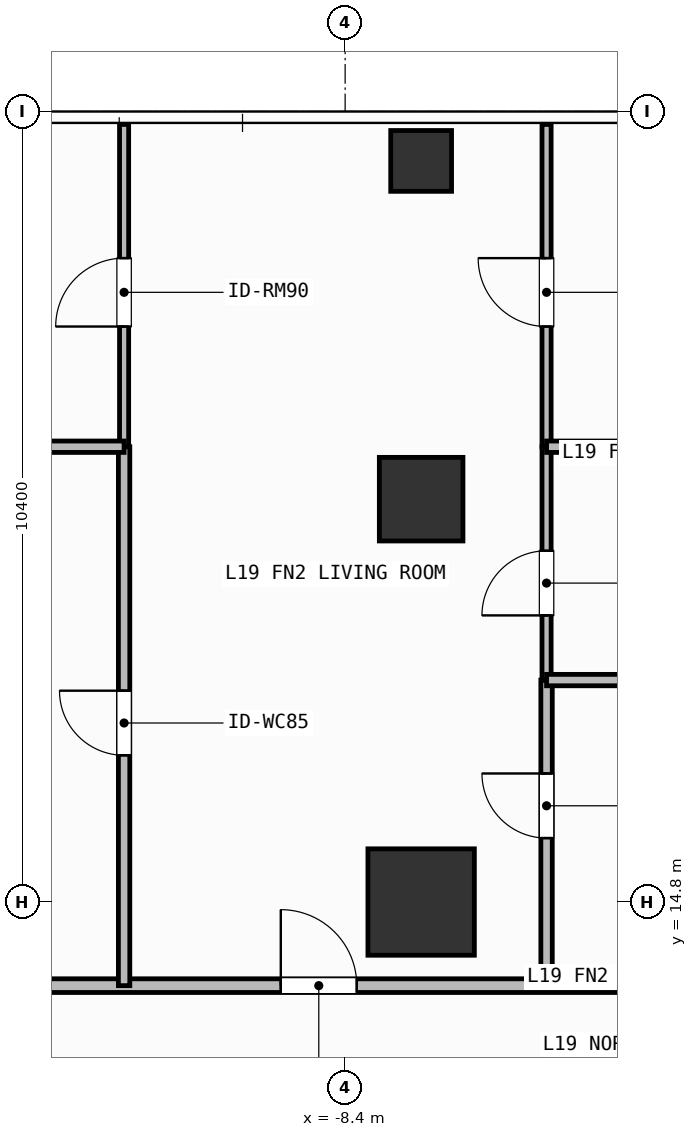
"""IFC4 building model, lengths in metres.
Left out: names, types, materials, properties, quantities, classifications, styles, units other than length and angle.
Written with IfcOpenShell. Run it as: python <this file> out.ifc"""

import sys

from ifc_helpers import new_model, si_unit, direction, frame, frame_2d, origin, origin_2d, place, context, subcontext, project, spatial, rectangle, hollow_rectangle, extrude, element, fill, save


model = new_model("IFC4")
c1 = context("Model", 3, precision=1e-05, world=origin(), true_north=direction((0.0, 1.0)))
c2 = subcontext(c1, "Body", "Model", "MODEL_VIEW")
j1 = project(units=[si_unit("LENGTHUNIT", "METRE"), si_unit("PLANEANGLEUNIT", "RADIAN")], contexts=[c1])
p1 = place(None, origin())
s1 = spatial("IfcSite", under=j1, at=p1, CompositionType="ELEMENT")
p2 = place(p1, origin())
s2 = spatial("IfcBuilding", under=s1, at=p2, CompositionType="ELEMENT")
p3 = place(p2, frame((0.0, 0.0, 73.5)))
s3 = spatial("IfcBuildingStorey", under=s2, at=p3, CompositionType="ELEMENT", Elevation=73.5)
p4 = place(p3, frame((-7.4, 14.8, 0.0), z_axis=(0.0, 0.0, 1.0), x_axis=(1.0, 0.0, 0.0)))
e1 = element("IfcColumn", 1, at=p4, inside=s3, PredefinedType="COLUMN", context=c2, shape_type="SweptSolid", body=[
    extrude(rectangle(XDim=1.4, YDim=1.4, at=origin_2d()), origin(), (0.0, 0.0, 1.0), 3.9),
])
p5 = place(p3, frame((-7.4, 20.1, 0.0), z_axis=(0.0, 0.0, 1.0), x_axis=(1.0, 0.0, 0.0)))
e2 = element("IfcColumn", 2, at=p5, inside=s3, PredefinedType="COLUMN", context=c2, shape_type="SweptSolid", body=[
    extrude(rectangle(XDim=1.1, YDim=1.1, at=origin_2d()), origin(), (0.0, 0.0, 1.0), 3.9),
])
p6 = place(p3, frame((-7.4, 24.55, 0.0), z_axis=(0.0, 0.0, 1.0), x_axis=(1.0, 0.0, 0.0)))
e3 = element("IfcColumn", 3, at=p6, inside=s3, PredefinedType="COLUMN", context=c2, shape_type="SweptSolid", body=[
    extrude(hollow_rectangle(XDim=0.8, YDim=0.8, WallThickness=0.036, at=origin_2d()), origin(), (0.0, 0.0, 1.0), 3.9),
])
p7 = place(p3, frame((-14.951, 13.7, 0.0), z_axis=(0.0, 0.0, 1.0), x_axis=(1.0, 0.0, 0.0)))
e4 = element("IfcWall", 4, at=p7, inside=s3, PredefinedType="PARTITIONING", context=c2, shape_type="SweptSolid", body=[
    extrude(rectangle(XDim=12.051, YDim=0.18, at=frame_2d((6.025, 0.0))), origin(), (0.0, 0.0, 1.0), 3.6),
])
p8 = place(p7, frame((5.704, 0.0, 0.0)))
e5 = element("IfcOpeningElement", 5, at=p8, cuts=e4, PredefinedType="OPENING", context=c2, shape_type="SweptSolid", body=[
    extrude(rectangle(XDim=1.0, YDim=2.2, at=frame_2d((0.5, 1.1))), frame((0.0, 0.1, 0.0), z_axis=(0.0, -1.0, 0.0), x_axis=(1.0, 0.0, 0.0)), (0.0, 0.0, 1.0), 0.2),
])
p9 = place(p3, frame((-11.308, 13.7, 0.0), z_axis=(0.0, 0.0, 1.0), x_axis=(0.0, 1.0, 0.0)))
e6 = element("IfcWall", 6, at=p9, inside=s3, PredefinedType="PARTITIONING", context=c2, shape_type="SweptSolid", body=[
    extrude(rectangle(XDim=7.09, YDim=0.15, at=frame_2d((3.545, 0.0))), origin(), (0.0, 0.0, 1.0), 3.29),
])
p10 = place(p9, frame((3.03, 0.0, 0.0)))
e7 = element("IfcOpeningElement", 7, at=p10, cuts=e6, PredefinedType="OPENING", context=c2, shape_type="SweptSolid", body=[
    extrude(rectangle(XDim=0.85, YDim=2.1, at=frame_2d((0.425, 1.05))), frame((0.0, 0.085, 0.0), z_axis=(0.0, -1.0, 0.0), x_axis=(1.0, 0.0, 0.0)), (0.0, 0.0, 1.0), 0.17),
])
p11 = place(p3, frame((-11.308, 20.79, 0.0), z_axis=(0.0, 0.0, 1.0), x_axis=(0.0, 1.0, 0.0)))
e8 = element("IfcWall", 8, at=p11, inside=s3, PredefinedType="PARTITIONING", context=c2, shape_type="SweptSolid", body=[
    extrude(rectangle(XDim=4.24, YDim=0.12, at=frame_2d((2.12, 0.0))), origin(), (0.0, 0.0, 1.0), 3.29),
])
p12 = place(p11, frame((1.581, 0.0, 0.0)))
e9 = element("IfcOpeningElement", 9, at=p12, cuts=e8, PredefinedType="OPENING", context=c2, shape_type="SweptSolid", body=[
    extrude(rectangle(XDim=0.9, YDim=2.1, at=frame_2d((0.45, 1.05))), frame((0.0, 0.07, 0.0), z_axis=(0.0, -1.0, 0.0), x_axis=(1.0, 0.0, 0.0)), (0.0, 0.0, 1.0), 0.14),
])
p13 = place(p3, frame((-5.75, 13.7, 0.0), z_axis=(0.0, 0.0, 1.0), x_axis=(0.0, 1.0, 0.0)))
e10 = element("IfcWall", 10, at=p13, inside=s3, PredefinedType="PARTITIONING", context=c2, shape_type="SweptSolid", body=[
    extrude(rectangle(XDim=4.02, YDim=0.15, at=frame_2d((2.01, 0.0))), origin(), (0.0, 0.0, 1.0), 3.6),
])
p14 = place(p13, frame((1.941, 0.0, 0.0)))
e11 = element("IfcOpeningElement", 11, at=p14, cuts=e10, PredefinedType="OPENING", context=c2, shape_type="SweptSolid", body=[
    extrude(rectangle(XDim=0.85, YDim=2.1, at=frame_2d((0.425, 1.05))), frame((0.0, 0.085, 0.0), z_axis=(0.0, -1.0, 0.0), x_axis=(1.0, 0.0, 0.0)), (0.0, 0.0, 1.0), 0.17),
])
p15 = place(p3, frame((-5.75, 17.72, 0.0), z_axis=(0.0, 0.0, 1.0), x_axis=(0.0, 1.0, 0.0)))
e12 = element("IfcWall", 12, at=p15, inside=s3, PredefinedType="PARTITIONING", context=c2, shape_type="SweptSolid", body=[
    extrude(rectangle(XDim=3.07, YDim=0.12, at=frame_2d((1.535, 0.0))), origin(), (0.0, 0.0, 1.0), 3.6),
])
p16 = place(p15, frame((0.851, 0.0, 0.0)))
e13 = element("IfcOpeningElement", 13, at=p16, cuts=e12, PredefinedType="OPENING", context=c2, shape_type="SweptSolid", body=[
    extrude(rectangle(XDim=0.85, YDim=2.1, at=frame_2d((0.425, 1.05))), frame((0.0, 0.07, 0.0), z_axis=(0.0, -1.0, 0.0), x_axis=(1.0, 0.0, 0.0)), (0.0, 0.0, 1.0), 0.14),
])
p17 = place(p3, frame((-5.75, 20.79, 0.0), z_axis=(0.0, 0.0, 1.0), x_axis=(0.0, 1.0, 0.0)))
e14 = element("IfcWall", 14, at=p17, inside=s3, PredefinedType="PARTITIONING", context=c2, shape_type="SweptSolid", body=[
    extrude(rectangle(XDim=4.24, YDim=0.12, at=frame_2d((2.12, 0.0))), origin(), (0.0, 0.0, 1.0), 3.6),
])
p18 = place(p17, frame((1.581, 0.0, 0.0)))
e15 = element("IfcOpeningElement", 15, at=p18, cuts=e14, PredefinedType="OPENING", context=c2, shape_type="SweptSolid", body=[
    extrude(rectangle(XDim=0.9, YDim=2.1, at=frame_2d((0.45, 1.05))), frame((0.0, 0.07, 0.0), z_axis=(0.0, -1.0, 0.0), x_axis=(1.0, 0.0, 0.0)), (0.0, 0.0, 1.0), 0.14),
])
p19 = place(p3, frame((-14.951, 20.79, 0.0), z_axis=(0.0, 0.0, 1.0), x_axis=(1.0, 0.0, 0.0)))
e16 = element("IfcWall", 16, at=p19, inside=s3, PredefinedType="PARTITIONING", context=c2, shape_type="SweptSolid", body=[
    extrude(rectangle(XDim=3.643, YDim=0.15, at=frame_2d((1.821, 0.0))), origin(), (0.0, 0.0, 1.0), 3.6),
])
for number, where, z_axis, x_axis in (
    (17, (-5.75, 17.72, 0.0), (0.0, 0.0, 1.0), (1.0, 0.0, 0.0)),
    (18, (-5.75, 20.79, 0.0), (0.0, 0.0, 1.0), (1.0, 0.0, 0.0)),
):
    element("IfcWall", number, at=place(p3, frame(where, z_axis=z_axis, x_axis=x_axis)), inside=s3, PredefinedType="PARTITIONING", context=c2, shape_type="SweptSolid", body=[
        extrude(rectangle(XDim=2.85, YDim=0.15, at=frame_2d((1.425, 0.0))), origin(), (0.0, 0.0, 1.0), 3.6),
    ])
p20 = place(p8, origin())
e19 = element("IfcDoor", 19, at=p20, inside=s3, OperationType="SINGLE_SWING_LEFT", PredefinedType="DOOR", context=c2, shape_type="SweptSolid", body=[
    extrude(rectangle(XDim=1.0, YDim=2.2, at=frame_2d((0.5, 1.1))), frame((0.0, 0.025, 0.0), z_axis=(0.0, -1.0, 0.0), x_axis=(1.0, 0.0, 0.0)), (0.0, 0.0, 1.0), 0.05),
])
fill(e5, e19)
p21 = place(p10, origin())
e20 = element("IfcDoor", 20, at=p21, inside=s3, OperationType="SINGLE_SWING_RIGHT", PredefinedType="DOOR", context=c2, shape_type="SweptSolid", body=[
    extrude(rectangle(XDim=0.85, YDim=2.1, at=frame_2d((0.425, 1.05))), frame((0.0, 0.025, 0.0), z_axis=(0.0, -1.0, 0.0), x_axis=(1.0, 0.0, 0.0)), (0.0, 0.0, 1.0), 0.05),
])
fill(e7, e20)
p22 = place(p12, origin())
e21 = element("IfcDoor", 21, at=p22, inside=s3, OperationType="SINGLE_SWING_LEFT", PredefinedType="DOOR", context=c2, shape_type="SweptSolid", body=[
    extrude(rectangle(XDim=0.9, YDim=2.1, at=frame_2d((0.45, 1.05))), frame((0.0, 0.025, 0.0), z_axis=(0.0, -1.0, 0.0), x_axis=(1.0, 0.0, 0.0)), (0.0, 0.0, 1.0), 0.05),
])
fill(e9, e21)
p23 = place(p14, origin())
e22 = element("IfcDoor", 22, at=p23, inside=s3, OperationType="SINGLE_SWING_RIGHT", PredefinedType="DOOR", context=c2, shape_type="SweptSolid", body=[
    extrude(rectangle(XDim=0.85, YDim=2.1, at=frame_2d((0.425, 1.05))), frame((0.0, 0.025, 0.0), z_axis=(0.0, -1.0, 0.0), x_axis=(1.0, 0.0, 0.0)), (0.0, 0.0, 1.0), 0.05),
])
fill(e11, e22)
p24 = place(p16, origin())
e23 = element("IfcDoor", 23, at=p24, inside=s3, OperationType="SINGLE_SWING_LEFT", PredefinedType="DOOR", context=c2, shape_type="SweptSolid", body=[
    extrude(rectangle(XDim=0.85, YDim=2.1, at=frame_2d((0.425, 1.05))), frame((0.0, 0.025, 0.0), z_axis=(0.0, -1.0, 0.0), x_axis=(1.0, 0.0, 0.0)), (0.0, 0.0, 1.0), 0.05),
])
fill(e13, e23)
p25 = place(p18, origin())
e24 = element("IfcDoor", 24, at=p25, inside=s3, OperationType="SINGLE_SWING_RIGHT", PredefinedType="DOOR", context=c2, shape_type="SweptSolid", body=[
    extrude(rectangle(XDim=0.9, YDim=2.1, at=frame_2d((0.45, 1.05))), frame((0.0, 0.025, 0.0), z_axis=(0.0, -1.0, 0.0), x_axis=(1.0, 0.0, 0.0)), (0.0, 0.0, 1.0), 0.05),
])
fill(e15, e24)
save(model, sys.argv[1])
